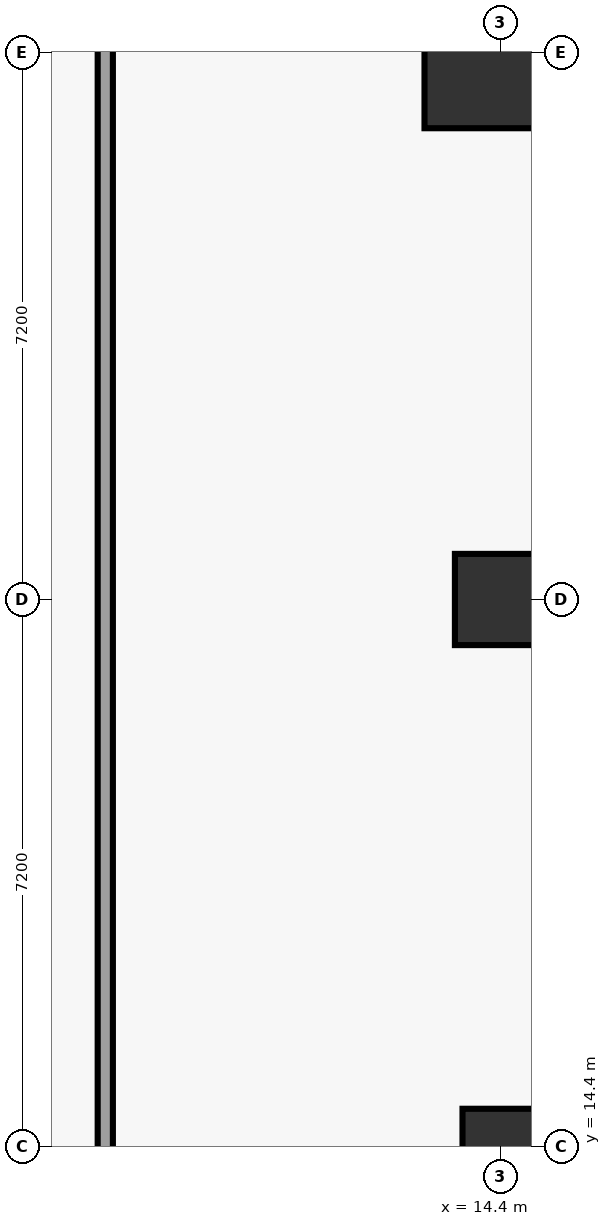
"""IFC4 building model, lengths in metres.
Left out: names, types, materials, properties, quantities, classifications, styles, units other than length and angle.
Written with IfcOpenShell. Run it as: python <this file> out.ifc"""

import sys

from ifc_helpers import new_model, si_unit, direction, frame, frame_2d, origin, origin_2d, place, context, subcontext, project, spatial, rectangle, circle, extrude, element, save


model = new_model("IFC4")
c1 = context("Model", 3, precision=1e-05, world=origin(), true_north=direction((0.0, 1.0)))
c2 = subcontext(c1, "Body", "Model", "MODEL_VIEW")
j1 = project(units=[si_unit("LENGTHUNIT", "METRE"), si_unit("PLANEANGLEUNIT", "RADIAN")], contexts=[c1])
p1 = place(None, origin())
s1 = spatial("IfcSite", under=j1, at=p1, CompositionType="ELEMENT")
p2 = place(p1, origin())
s2 = spatial("IfcBuilding", under=s1, at=p2, CompositionType="ELEMENT")
p3 = place(p2, frame((0.0, 0.0, -5.4)))
s3 = spatial("IfcBuildingStorey", under=s2, at=p3, CompositionType="ELEMENT", Elevation=-5.4)
p4 = place(p3, frame((14.4, 14.4, 0.0), z_axis=(0.0, 0.0, 1.0), x_axis=(1.0, 0.0, 0.0)))
e1 = element("IfcColumn", 1, at=p4, inside=s3, PredefinedType="COLUMN", context=c2, shape_type="SweptSolid", body=[
    extrude(circle(Radius=0.5, at=origin_2d()), origin(), (0.0, 0.0, 1.0), 5.4),
])
p5 = place(p3, frame((14.4, 21.6, 0.0), z_axis=(0.0, 0.0, 1.0), x_axis=(1.0, 0.0, 0.0)))
e2 = element("IfcColumn", 2, at=p5, inside=s3, PredefinedType="COLUMN", context=c2, shape_type="SweptSolid", body=[
    extrude(circle(Radius=0.6, at=origin_2d()), origin(), (0.0, 0.0, 1.0), 5.4),
])
p6 = place(p3, frame((14.4, 28.8, 0.0), z_axis=(0.0, 0.0, 1.0), x_axis=(1.0, 0.0, 0.0)))
e3 = element("IfcColumn", 3, at=p6, inside=s3, PredefinedType="COLUMN", context=c2, shape_type="SweptSolid", body=[
    extrude(circle(Radius=1.0, at=origin_2d()), origin(), (0.0, 0.0, 1.0), 5.4),
])
p7 = place(p3, frame((9.2, 50.4, 0.0), z_axis=(0.0, 0.0, 1.0), x_axis=(0.0, -1.0, 0.0)))
e4 = element("IfcWall", 4, at=p7, inside=s3, PredefinedType="PARTITIONING", context=c2, shape_type="SweptSolid", body=[
    extrude(rectangle(XDim=41.2, YDim=0.2, at=frame_2d((20.6, 0.0))), origin(), (0.0, 0.0, 1.0), 4.04),
])
save(model, sys.argv[1])
